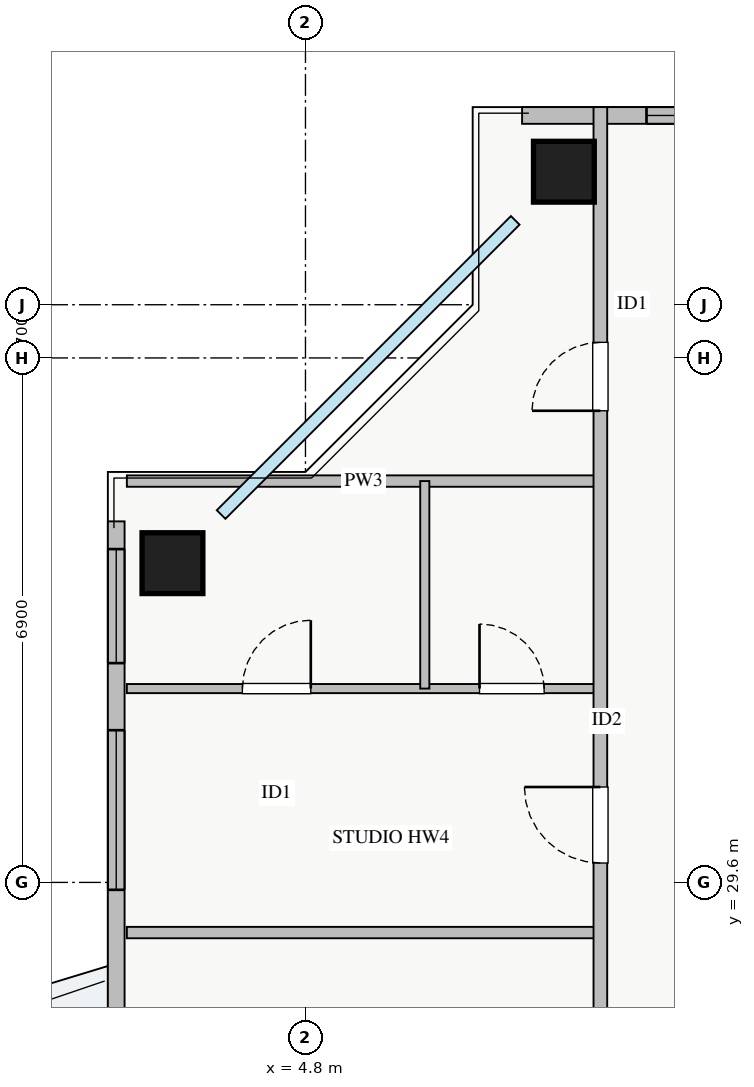
"""IFC4 building model, lengths in metres.
Left out: names, types, materials, properties, quantities, classifications, styles, units other than length and angle.
Written with IfcOpenShell. Run it as: python <this file> out.ifc"""

import sys

from ifc_helpers import new_model, si_unit, direction, frame, frame_2d, origin, origin_2d, place, context, subcontext, project, spatial, rectangle, extrude, source, transform, mapped, element, fill, save


model = new_model("IFC4")
c1 = context("Model", 3, precision=1e-05, world=origin(), true_north=direction((0.0, 1.0)))
c2 = subcontext(c1, "Body", "Model", "MODEL_VIEW")
j1 = project(units=[si_unit("LENGTHUNIT", "METRE"), si_unit("PLANEANGLEUNIT", "RADIAN")], contexts=[c1])
p1 = place(None, origin())
s1 = spatial("IfcSite", under=j1, at=p1, CompositionType="ELEMENT")
p2 = place(p1, origin())
s2 = spatial("IfcBuilding", under=s1, at=p2, CompositionType="ELEMENT")
p3 = place(p2, frame((0.0, 0.0, 213.25)))
s3 = spatial("IfcBuildingStorey", under=s2, at=p3, CompositionType="ELEMENT", Elevation=213.25)
m1 = source(origin(), c2, "Body", "SweptSolid", [
    extrude(rectangle(XDim=0.8, YDim=0.8, at=origin_2d()), origin(), (0.0, 0.0, 1.0), 3.25),
])
for number, where, z_axis, x_axis in (
    (1, (8.2, 38.95, 0.0), (0.0, 0.0, 1.0), (1.0, 0.0, 0.0)),
    (2, (3.05, 33.8, 0.0), (0.0, 0.0, 1.0), (1.0, 0.0, 0.0)),
):
    element("IfcColumn", number, at=place(p3, frame(where, z_axis=z_axis, x_axis=x_axis)), inside=s3, PredefinedType="COLUMN", context=c2, shape_type="MappedRepresentation", body=[
        mapped(m1, transform((0.0, 0.0, 0.0), x_axis=(1.0, 0.0, 0.0), y_axis=(0.0, 1.0, 0.0), z_axis=(0.0, 0.0, 1.0), scale=1.0)),
    ])
p4 = place(p3, frame((7.65, 39.69, 0.0), z_axis=(0.0, 0.0, 1.0), x_axis=(1.0, 0.0, 0.0)))
e3 = element("IfcWall", 3, at=p4, inside=s3, PredefinedType="STANDARD", context=c2, shape_type="SweptSolid", body=[
    extrude(rectangle(XDim=22.7, YDim=0.22, at=frame_2d((11.35, 0.0))), origin(), (0.0, 0.0, 1.0), 2.61),
])
p5 = place(p4, frame((12.2, 0.0, 0.0)))
e4 = element("IfcOpeningElement", 4, at=p5, cuts=e3, PredefinedType="OPENING", context=c2, shape_type="SweptSolid", body=[
    extrude(rectangle(XDim=1.2, YDim=2.1, at=frame_2d((0.6, 1.05))), frame((0.0, 0.12, 0.0), z_axis=(0.0, -1.0, 0.0), x_axis=(1.0, 0.0, 0.0)), (0.0, 0.0, 1.0), 0.24),
])
p6 = place(p4, frame((1.637, 0.0, 0.9)))
e5 = element("IfcOpeningElement", 5, at=p6, cuts=e3, PredefinedType="OPENING", context=c2, shape_type="SweptSolid", body=[
    extrude(rectangle(XDim=2.4, YDim=1.48, at=frame_2d((1.2, 0.74))), frame((0.0, 0.12, 0.0), z_axis=(0.0, -1.0, 0.0), x_axis=(1.0, 0.0, 0.0)), (0.0, 0.0, 1.0), 0.24),
])
p7 = place(p4, frame((7.612, 0.0, 0.9)))
e6 = element("IfcOpeningElement", 6, at=p7, cuts=e3, PredefinedType="OPENING", context=c2, shape_type="SweptSolid", body=[
    extrude(rectangle(XDim=1.8, YDim=1.45, at=frame_2d((0.9, 0.725))), frame((0.0, 0.12, 0.0), z_axis=(0.0, -1.0, 0.0), x_axis=(1.0, 0.0, 0.0)), (0.0, 0.0, 1.0), 0.24),
])
p8 = place(p4, frame((17.92, 0.0, 0.9)))
e7 = element("IfcOpeningElement", 7, at=p8, cuts=e3, PredefinedType="OPENING", context=c2, shape_type="SweptSolid", body=[
    extrude(rectangle(XDim=2.1, YDim=1.5, at=frame_2d((1.05, 0.75))), frame((0.0, 0.12, 0.0), z_axis=(0.0, -1.0, 0.0), x_axis=(1.0, 0.0, 0.0)), (0.0, 0.0, 1.0), 0.24),
])
p9 = place(p4, frame((20.637, 0.0, 0.9)))
e8 = element("IfcOpeningElement", 8, at=p9, cuts=e3, PredefinedType="OPENING", context=c2, shape_type="SweptSolid", body=[
    extrude(rectangle(XDim=1.8, YDim=1.5, at=frame_2d((0.9, 0.75))), frame((0.0, 0.12, 0.0), z_axis=(0.0, -1.0, 0.0), x_axis=(1.0, 0.0, 0.0)), (0.0, 0.0, 1.0), 0.24),
])
p10 = place(p3, frame((2.31, 11.65, 0.0), z_axis=(0.0, 0.0, 1.0), x_axis=(0.0, 1.0, 0.0)))
e9 = element("IfcWall", 9, at=p10, inside=s3, PredefinedType="STANDARD", context=c2, shape_type="SweptSolid", body=[
    extrude(rectangle(XDim=22.7, YDim=0.22, at=frame_2d((11.35, 0.0))), origin(), (0.0, 0.0, 1.0), 2.61),
])
p11 = place(p10, frame((12.2, 0.0, 0.0)))
e10 = element("IfcOpeningElement", 10, at=p11, cuts=e9, PredefinedType="OPENING", context=c2, shape_type="SweptSolid", body=[
    extrude(rectangle(XDim=1.2, YDim=2.1, at=frame_2d((0.6, 1.05))), frame((0.0, 0.12, 0.0), z_axis=(0.0, -1.0, 0.0), x_axis=(1.0, 0.0, 0.0)), (0.0, 0.0, 1.0), 0.24),
])
p12 = place(p10, frame((2.607, 0.0, 0.9)))
e11 = element("IfcOpeningElement", 11, at=p12, cuts=e9, PredefinedType="OPENING", context=c2, shape_type="SweptSolid", body=[
    extrude(rectangle(XDim=1.8, YDim=1.5, at=frame_2d((0.9, 0.75))), frame((0.0, 0.12, 0.0), z_axis=(0.0, -1.0, 0.0), x_axis=(1.0, 0.0, 0.0)), (0.0, 0.0, 1.0), 0.24),
])
p13 = place(p10, frame((17.853, 0.0, 0.9)))
e12 = element("IfcOpeningElement", 12, at=p13, cuts=e9, PredefinedType="OPENING", context=c2, shape_type="SweptSolid", body=[
    extrude(rectangle(XDim=2.1, YDim=1.5, at=frame_2d((1.05, 0.75))), frame((0.0, 0.12, 0.0), z_axis=(0.0, -1.0, 0.0), x_axis=(1.0, 0.0, 0.0)), (0.0, 0.0, 1.0), 0.24),
])
p14 = place(p10, frame((0.385, 0.0, 0.9)))
e13 = element("IfcOpeningElement", 13, at=p14, cuts=e9, PredefinedType="OPENING", context=c2, shape_type="SweptSolid", body=[
    extrude(rectangle(XDim=1.5, YDim=1.5, at=frame_2d((0.75, 0.75))), frame((0.0, 0.12, 0.0), z_axis=(0.0, -1.0, 0.0), x_axis=(1.0, 0.0, 0.0)), (0.0, 0.0, 1.0), 0.24),
])
p15 = place(p10, frame((20.835, 0.0, 0.9)))
e14 = element("IfcOpeningElement", 14, at=p15, cuts=e9, PredefinedType="OPENING", context=c2, shape_type="SweptSolid", body=[
    extrude(rectangle(XDim=1.5, YDim=1.5, at=frame_2d((0.75, 0.75))), frame((0.0, 0.12, 0.0), z_axis=(0.0, -1.0, 0.0), x_axis=(1.0, 0.0, 0.0)), (0.0, 0.0, 1.0), 0.24),
])
p16 = place(p10, frame((5.025, 0.0, 0.9)))
e15 = element("IfcOpeningElement", 15, at=p16, cuts=e9, PredefinedType="OPENING", context=c2, shape_type="SweptSolid", body=[
    extrude(rectangle(XDim=0.9, YDim=1.2, at=frame_2d((0.45, 0.6))), frame((0.0, 0.12, 0.0), z_axis=(0.0, -1.0, 0.0), x_axis=(1.0, 0.0, 0.0)), (0.0, 0.0, 1.0), 0.24),
])
p17 = place(p3, frame((2.45, 34.88, 0.0), z_axis=(0.0, 0.0, 1.0), x_axis=(1.0, 0.0, 0.0)))
e16 = element("IfcWall", 16, at=p17, inside=s3, PredefinedType="PARTITIONING", context=c2, shape_type="SweptSolid", body=[
    extrude(rectangle(XDim=6.23, YDim=0.15, at=frame_2d((3.115, 0.0))), origin(), (0.0, 0.0, 1.0), 3.07),
])
p18 = place(p3, frame((2.45, 32.15, 0.0), z_axis=(0.0, 0.0, 1.0), x_axis=(1.0, 0.0, 0.0)))
e17 = element("IfcWall", 17, at=p18, inside=s3, PredefinedType="PLUMBINGWALL", context=c2, shape_type="SweptSolid", body=[
    extrude(rectangle(XDim=6.23, YDim=0.12, at=frame_2d((3.115, 0.0))), origin(), (0.0, 0.0, 1.0), 3.07),
])
p19 = place(p18, frame((1.52, 0.0, 0.0)))
e18 = element("IfcOpeningElement", 18, at=p19, cuts=e17, PredefinedType="OPENING", context=c2, shape_type="SweptSolid", body=[
    extrude(rectangle(XDim=0.9, YDim=2.05, at=frame_2d((0.45, 1.025))), frame((0.0, 0.07, 0.0), z_axis=(0.0, -1.0, 0.0), x_axis=(1.0, 0.0, 0.0)), (0.0, 0.0, 1.0), 0.14),
])
p20 = place(p18, frame((4.64, 0.0, 0.0)))
e19 = element("IfcOpeningElement", 19, at=p20, cuts=e17, PredefinedType="OPENING", context=c2, shape_type="SweptSolid", body=[
    extrude(rectangle(XDim=0.85, YDim=2.05, at=frame_2d((0.425, 1.025))), frame((0.0, 0.07, 0.0), z_axis=(0.0, -1.0, 0.0), x_axis=(1.0, 0.0, 0.0)), (0.0, 0.0, 1.0), 0.14),
])
p21 = place(p3, frame((6.37, 32.15, 0.0), z_axis=(0.0, 0.0, 1.0), x_axis=(0.0, 1.0, 0.0)))
e20 = element("IfcWall", 20, at=p21, inside=s3, PredefinedType="PLUMBINGWALL", context=c2, shape_type="SweptSolid", body=[
    extrude(rectangle(XDim=2.73, YDim=0.12, at=frame_2d((1.365, 0.0))), origin(), (0.0, 0.0, 1.0), 3.07),
])
p22 = place(p3, frame((2.45, 28.94, 0.0), z_axis=(0.0, 0.0, 1.0), x_axis=(1.0, 0.0, 0.0)))
e21 = element("IfcWall", 21, at=p22, inside=s3, PredefinedType="PARTITIONING", context=c2, shape_type="SweptSolid", body=[
    extrude(rectangle(XDim=6.23, YDim=0.15, at=frame_2d((3.115, 0.0))), origin(), (0.0, 0.0, 1.0), 3.07),
])
p23 = place(p3, frame((8.68, 6.2, 0.0), z_axis=(0.0, 0.0, 1.0), x_axis=(0.0, 1.0, 0.0)))
e22 = element("IfcWall", 22, at=p23, inside=s3, PredefinedType="PARTITIONING", context=c2, shape_type="SweptSolid", body=[
    extrude(rectangle(XDim=33.6, YDim=0.18, at=frame_2d((16.8, 0.0))), origin(), (0.0, 0.0, 1.0), 3.07),
])
p24 = place(p23, frame((29.605, 0.0, 0.0)))
e23 = element("IfcOpeningElement", 23, at=p24, cuts=e22, PredefinedType="OPENING", context=c2, shape_type="SweptSolid", body=[
    extrude(rectangle(XDim=0.9, YDim=2.05, at=frame_2d((0.45, 1.025))), frame((0.0, 0.1, 0.0), z_axis=(0.0, -1.0, 0.0), x_axis=(1.0, 0.0, 0.0)), (0.0, 0.0, 1.0), 0.2),
])
p25 = place(p23, frame((2.92, 0.0, 0.0)))
e24 = element("IfcOpeningElement", 24, at=p25, cuts=e22, PredefinedType="OPENING", context=c2, shape_type="SweptSolid", body=[
    extrude(rectangle(XDim=0.9, YDim=2.05, at=frame_2d((0.45, 1.025))), frame((0.0, 0.1, 0.0), z_axis=(0.0, -1.0, 0.0), x_axis=(1.0, 0.0, 0.0)), (0.0, 0.0, 1.0), 0.2),
])
p26 = place(p23, frame((5.615, 0.0, 0.0)))
e25 = element("IfcOpeningElement", 25, at=p26, cuts=e22, PredefinedType="OPENING", context=c2, shape_type="SweptSolid", body=[
    extrude(rectangle(XDim=1.0, YDim=2.05, at=frame_2d((0.5, 1.025))), frame((0.0, 0.1, 0.0), z_axis=(0.0, -1.0, 0.0), x_axis=(1.0, 0.0, 0.0)), (0.0, 0.0, 1.0), 0.2),
])
p27 = place(p23, frame((10.54, 0.0, 0.0)))
e26 = element("IfcOpeningElement", 26, at=p27, cuts=e22, PredefinedType="OPENING", context=c2, shape_type="SweptSolid", body=[
    extrude(rectangle(XDim=1.0, YDim=2.05, at=frame_2d((0.5, 1.025))), frame((0.0, 0.1, 0.0), z_axis=(0.0, -1.0, 0.0), x_axis=(1.0, 0.0, 0.0)), (0.0, 0.0, 1.0), 0.2),
])
p28 = place(p23, frame((19.27, 0.0, 0.0)))
e27 = element("IfcOpeningElement", 27, at=p28, cuts=e22, PredefinedType="OPENING", context=c2, shape_type="SweptSolid", body=[
    extrude(rectangle(XDim=1.0, YDim=2.05, at=frame_2d((0.5, 1.025))), frame((0.0, 0.1, 0.0), z_axis=(0.0, -1.0, 0.0), x_axis=(1.0, 0.0, 0.0)), (0.0, 0.0, 1.0), 0.2),
])
p29 = place(p23, frame((23.655, 0.0, 0.0)))
e28 = element("IfcOpeningElement", 28, at=p29, cuts=e22, PredefinedType="OPENING", context=c2, shape_type="SweptSolid", body=[
    extrude(rectangle(XDim=1.0, YDim=2.05, at=frame_2d((0.5, 1.025))), frame((0.0, 0.1, 0.0), z_axis=(0.0, -1.0, 0.0), x_axis=(1.0, 0.0, 0.0)), (0.0, 0.0, 1.0), 0.2),
])
m2 = source(origin(), c2, "Body", "SweptSolid", [
    extrude(rectangle(XDim=2.4, YDim=1.48, at=frame_2d((1.2, 0.74))), frame((0.0, 0.03, 0.0), z_axis=(0.0, -1.0, 0.0), x_axis=(1.0, 0.0, 0.0)), (0.0, 0.0, 1.0), 0.06),
])
p30 = place(p6, origin())
e29 = element("IfcWindow", 29, at=p30, inside=s3, PartitioningType="TRIPLE_PANEL_VERTICAL", PredefinedType="WINDOW", context=c2, shape_type="MappedRepresentation", body=[
    mapped(m2, transform((0.0, 0.0, 0.0), x_axis=(1.0, 0.0, 0.0), y_axis=(0.0, 1.0, 0.0), z_axis=(0.0, 0.0, 1.0), scale=1.0)),
])
fill(e5, e29)
m3 = source(origin(), c2, "Body", "SweptSolid", [
    extrude(rectangle(XDim=2.1, YDim=1.5, at=frame_2d((1.05, 0.75))), frame((0.0, 0.03, 0.0), z_axis=(0.0, -1.0, 0.0), x_axis=(1.0, 0.0, 0.0)), (0.0, 0.0, 1.0), 0.06),
])
p31 = place(p13, origin())
e30 = element("IfcWindow", 30, at=p31, inside=s3, PartitioningType="TRIPLE_PANEL_VERTICAL", PredefinedType="WINDOW", context=c2, shape_type="MappedRepresentation", body=[
    mapped(m3, transform((0.0, 0.0, 0.0), x_axis=(1.0, 0.0, 0.0), y_axis=(0.0, 1.0, 0.0), z_axis=(0.0, 0.0, 1.0), scale=1.0)),
])
fill(e12, e30)
m4 = source(origin(), c2, "Body", "SweptSolid", [
    extrude(rectangle(XDim=0.9, YDim=2.05, at=frame_2d((0.45, 1.025))), frame((0.0, 0.025, 0.0), z_axis=(0.0, -1.0, 0.0), x_axis=(1.0, 0.0, 0.0)), (0.0, 0.0, 1.0), 0.05),
])
p32 = place(p19, origin())
e31 = element("IfcDoor", 31, at=p32, inside=s3, OperationType="SINGLE_SWING_RIGHT", PredefinedType="DOOR", context=c2, shape_type="MappedRepresentation", body=[
    mapped(m4, transform((0.0, 0.0, 0.0), x_axis=(1.0, 0.0, 0.0), y_axis=(0.0, 1.0, 0.0), z_axis=(0.0, 0.0, 1.0), scale=1.0)),
])
fill(e18, e31)
m5 = source(origin(), c2, "Body", "SweptSolid", [
    extrude(rectangle(XDim=0.85, YDim=2.05, at=frame_2d((0.425, 1.025))), frame((0.0, 0.025, 0.0), z_axis=(0.0, -1.0, 0.0), x_axis=(1.0, 0.0, 0.0)), (0.0, 0.0, 1.0), 0.05),
])
p33 = place(p20, origin())
e32 = element("IfcDoor", 32, at=p33, inside=s3, OperationType="SINGLE_SWING_LEFT", PredefinedType="DOOR", context=c2, shape_type="MappedRepresentation", body=[
    mapped(m5, transform((0.0, 0.0, 0.0), x_axis=(1.0, 0.0, 0.0), y_axis=(0.0, 1.0, 0.0), z_axis=(0.0, 0.0, 1.0), scale=1.0)),
])
fill(e19, e32)
p34 = place(p24, origin())
e33 = element("IfcDoor", 33, at=p34, inside=s3, OperationType="SINGLE_SWING_LEFT", PredefinedType="DOOR", context=c2, shape_type="MappedRepresentation", body=[
    mapped(m4, transform((0.0, 0.0, 0.0), x_axis=(1.0, 0.0, 0.0), y_axis=(0.0, 1.0, 0.0), z_axis=(0.0, 0.0, 1.0), scale=1.0)),
])
fill(e23, e33)
m6 = source(origin(), c2, "Body", "SweptSolid", [
    extrude(rectangle(XDim=1.0, YDim=2.05, at=frame_2d((0.5, 1.025))), frame((0.0, 0.025, 0.0), z_axis=(0.0, -1.0, 0.0), x_axis=(1.0, 0.0, 0.0)), (0.0, 0.0, 1.0), 0.05),
])
p35 = place(p29, origin())
e34 = element("IfcDoor", 34, at=p35, inside=s3, OperationType="SINGLE_SWING_RIGHT", PredefinedType="DOOR", context=c2, shape_type="MappedRepresentation", body=[
    mapped(m6, transform((0.0, 0.0, 0.0), x_axis=(1.0, 0.0, 0.0), y_axis=(0.0, 1.0, 0.0), z_axis=(0.0, 0.0, 1.0), scale=1.0)),
])
fill(e28, e34)
m7 = source(origin(), c2, "Body", "SweptSolid", [
    extrude(rectangle(XDim=1.5, YDim=1.5, at=frame_2d((0.75, 0.75))), frame((0.0, 0.03, 0.0), z_axis=(0.0, -1.0, 0.0), x_axis=(1.0, 0.0, 0.0)), (0.0, 0.0, 1.0), 0.06),
])
p36 = place(p15, origin())
e35 = element("IfcWindow", 35, at=p36, inside=s3, PartitioningType="DOUBLE_PANEL_VERTICAL", PredefinedType="WINDOW", context=c2, shape_type="MappedRepresentation", body=[
    mapped(m7, transform((0.0, 0.0, 0.0), x_axis=(1.0, 0.0, 0.0), y_axis=(0.0, 1.0, 0.0), z_axis=(0.0, 0.0, 1.0), scale=1.0)),
])
fill(e14, e35)
save(model, sys.argv[1])
